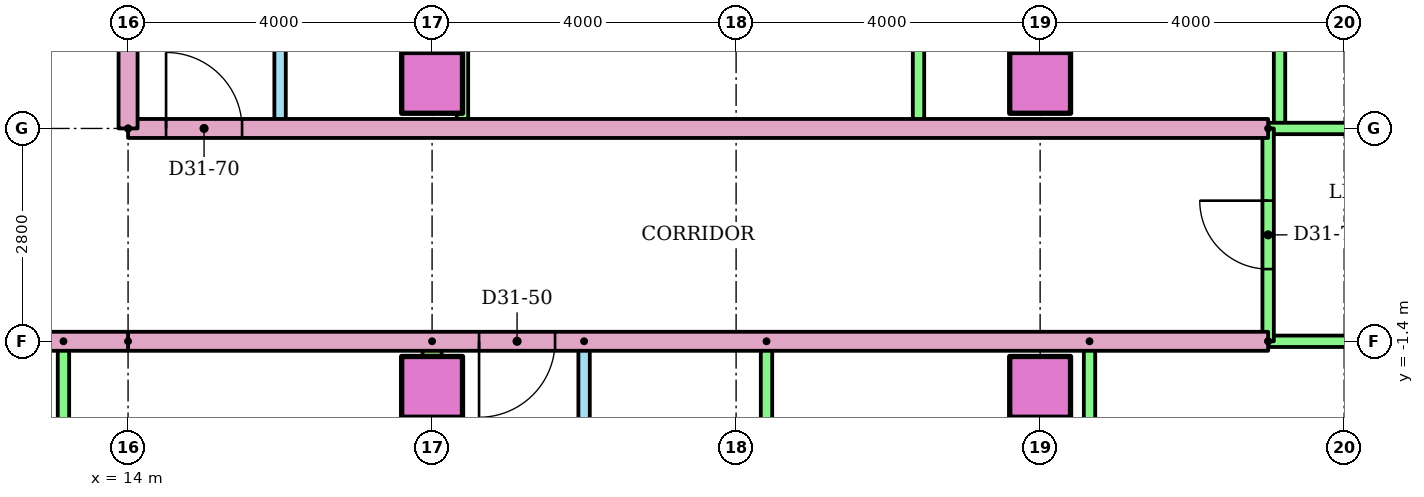
"""IFC4 building model, lengths in metres.
Left out: names, types, materials, properties, quantities, classifications, styles, units other than length and angle.
Written with IfcOpenShell. Run it as: python <this file> out.ifc"""

import sys

from ifc_helpers import new_model, si_unit, direction, frame, frame_2d, origin, origin_2d, place, context, subcontext, project, spatial, rectangle, extrude, element, fill, save


model = new_model("IFC4")
c1 = context("Model", 3, precision=1e-05, world=origin(), true_north=direction((0.0, 1.0)))
c2 = subcontext(c1, "Body", "Model", "MODEL_VIEW")
j1 = project(units=[si_unit("LENGTHUNIT", "METRE"), si_unit("PLANEANGLEUNIT", "RADIAN")], contexts=[c1])
p1 = place(None, origin())
s1 = spatial("IfcSite", under=j1, at=p1, CompositionType="ELEMENT")
p2 = place(p1, origin())
s2 = spatial("IfcBuilding", under=s1, at=p2, CompositionType="ELEMENT")
p3 = place(p2, frame((0.0, 0.0, 123.0)))
s3 = spatial("IfcBuildingStorey", under=s2, at=p3, CompositionType="ELEMENT", Elevation=123.0)
for number, where in (
    (1, (18.0, -2.0, 0.0)),
    (2, (26.0, -2.0, 0.0)),
    (3, (18.0, 2.0, 0.0)),
    (4, (26.0, 2.0, 0.0)),
):
    element("IfcColumn", number, at=place(p3, frame(where)), inside=s3, PredefinedType="COLUMN", context=c2, shape_type="SweptSolid", body=[
        extrude(rectangle(XDim=0.8, YDim=0.8, at=origin_2d()), origin(), (0.0, 0.0, 1.0), 3.2),
    ])
p4 = place(p3, frame((13.15, -1.4, 0.0), z_axis=(0.0, 0.0, 1.0), x_axis=(0.0, -1.0, 0.0)))
e5 = element("IfcWall", 5, at=p4, inside=s3, PredefinedType="PARTITIONING", context=c2, shape_type="SweptSolid", body=[
    extrude(rectangle(XDim=6.6, YDim=0.15, at=frame_2d((3.3, 0.0))), origin(), (0.0, 0.0, 1.0), 2.4),
])
p5 = place(p3, frame((20.0, -1.4, 0.0), z_axis=(0.0, 0.0, 1.0), x_axis=(0.0, -1.0, 0.0)))
e6 = element("IfcWall", 6, at=p5, inside=s3, PredefinedType="PARTITIONING", context=c2, shape_type="SweptSolid", body=[
    extrude(rectangle(XDim=6.6, YDim=0.15, at=frame_2d((3.3, 0.0))), origin(), (0.0, 0.0, 1.0), 2.4),
])
p6 = place(p5, frame((1.425, 0.0, 0.0)))
e7 = element("IfcOpeningElement", 7, at=p6, cuts=e6, PredefinedType="OPENING", context=c2, shape_type="SweptSolid", body=[
    extrude(rectangle(XDim=0.9, YDim=2.1, at=frame_2d((0.45, 1.05))), frame((0.0, 0.085, 0.0), z_axis=(0.0, -1.0, 0.0), x_axis=(1.0, 0.0, 0.0)), (0.0, 0.0, 1.0), 0.17),
])
p7 = place(p5, frame((4.775, 0.0, 0.0)))
e8 = element("IfcOpeningElement", 8, at=p7, cuts=e6, PredefinedType="OPENING", context=c2, shape_type="SweptSolid", body=[
    extrude(rectangle(XDim=0.8, YDim=2.1, at=frame_2d((0.4, 1.05))), frame((0.0, 0.085, 0.0), z_axis=(0.0, -1.0, 0.0), x_axis=(1.0, 0.0, 0.0)), (0.0, 0.0, 1.0), 0.17),
])
for number, where, z_axis, x_axis in (
    (9, (22.4, -1.4, 0.0), (0.0, 0.0, 1.0), (0.0, -1.0, 0.0)),
    (10, (26.65, -1.4, 0.0), (0.0, 0.0, 1.0), (0.0, -1.0, 0.0)),
):
    element("IfcWall", number, at=place(p3, frame(where, z_axis=z_axis, x_axis=x_axis)), inside=s3, PredefinedType="PARTITIONING", context=c2, shape_type="SweptSolid", body=[
        extrude(rectangle(XDim=6.6, YDim=0.15, at=frame_2d((3.3, 0.0))), origin(), (0.0, 0.0, 1.0), 2.4),
    ])
p8 = place(p3, frame((18.0, -1.4, 0.0), z_axis=(0.0, 0.0, 1.0), x_axis=(0.0, -1.0, 0.0)))
e11 = element("IfcWall", 11, at=p8, inside=s3, PredefinedType="PARTITIONING", context=c2, shape_type="SweptSolid", body=[
    extrude(rectangle(XDim=14.91, YDim=0.25, at=frame_2d((7.455, 0.0))), origin(), (0.0, 0.0, 1.0), 2.4),
])
p9 = place(p3, frame((29.0, -1.4, 0.0), z_axis=(0.0, 0.0, 1.0), x_axis=(-1.0, 0.0, 0.0)))
e12 = element("IfcWall", 12, at=p9, inside=s3, PredefinedType="PARTITIONING", context=c2, shape_type="SweptSolid", body=[
    extrude(rectangle(XDim=15.0, YDim=0.25, at=frame_2d((7.5, 0.0))), origin(), (0.0, 0.0, 1.0), 2.4),
])
p10 = place(p9, frame((9.382, 0.0, 0.0)))
e13 = element("IfcOpeningElement", 13, at=p10, cuts=e12, PredefinedType="OPENING", context=c2, shape_type="SweptSolid", body=[
    extrude(rectangle(XDim=1.0, YDim=2.1, at=frame_2d((0.5, 1.05))), frame((0.0, 0.135, 0.0), z_axis=(0.0, -1.0, 0.0), x_axis=(1.0, 0.0, 0.0)), (0.0, 0.0, 1.0), 0.27),
])
p11 = place(p3, frame((32.72, -1.4, 0.0), z_axis=(0.0, 0.0, 1.0), x_axis=(-1.0, 0.0, 0.0)))
e14 = element("IfcWall", 14, at=p11, inside=s3, PredefinedType="PARTITIONING", context=c2, shape_type="SweptSolid", body=[
    extrude(rectangle(XDim=3.72, YDim=0.15, at=frame_2d((1.86, 0.0))), origin(), (0.0, 0.0, 1.0), 2.4),
])
p12 = place(p3, frame((16.0, 10.4, 0.0), z_axis=(0.0, 0.0, 1.0), x_axis=(0.0, -1.0, 0.0)))
e15 = element("IfcWall", 15, at=p12, inside=s3, PredefinedType="PARTITIONING", context=c2, shape_type="SweptSolid", body=[
    extrude(rectangle(XDim=9.0, YDim=0.15, at=frame_2d((4.5, 0.0))), origin(), (0.0, 0.0, 1.0), 2.4),
])
p13 = place(p12, frame((6.05, 0.0, 0.0)))
e16 = element("IfcOpeningElement", 16, at=p13, cuts=e15, PredefinedType="OPENING", context=c2, shape_type="SweptSolid", body=[
    extrude(rectangle(XDim=0.9, YDim=2.1, at=frame_2d((0.45, 1.05))), frame((0.0, 0.085, 0.0), z_axis=(0.0, -1.0, 0.0), x_axis=(1.0, 0.0, 0.0)), (0.0, 0.0, 1.0), 0.17),
])
p14 = place(p12, frame((1.6, 0.0, 0.0)))
e17 = element("IfcOpeningElement", 17, at=p14, cuts=e15, PredefinedType="OPENING", context=c2, shape_type="SweptSolid", body=[
    extrude(rectangle(XDim=0.8, YDim=2.1, at=frame_2d((0.4, 1.05))), frame((0.0, 0.085, 0.0), z_axis=(0.0, -1.0, 0.0), x_axis=(1.0, 0.0, 0.0)), (0.0, 0.0, 1.0), 0.17),
])
for number, where, z_axis, x_axis in (
    (18, (18.4, 10.4, 0.0), (0.0, 0.0, 1.0), (0.0, -1.0, 0.0)),
    (19, (24.4, 10.4, 0.0), (0.0, 0.0, 1.0), (0.0, -1.0, 0.0)),
    (20, (29.15, 10.4, 0.0), (0.0, 0.0, 1.0), (0.0, -1.0, 0.0)),
):
    element("IfcWall", number, at=place(p3, frame(where, z_axis=z_axis, x_axis=x_axis)), inside=s3, PredefinedType="PARTITIONING", context=c2, shape_type="SweptSolid", body=[
        extrude(rectangle(XDim=9.0, YDim=0.15, at=frame_2d((4.5, 0.0))), origin(), (0.0, 0.0, 1.0), 2.4),
    ])
p15 = place(p3, frame((14.0, 1.4, 0.0)))
e21 = element("IfcWall", 21, at=p15, inside=s3, PredefinedType="PARTITIONING", context=c2, shape_type="SweptSolid", body=[
    extrude(rectangle(XDim=15.0, YDim=0.25, at=frame_2d((7.5, 0.0))), origin(), (0.0, 0.0, 1.0), 2.4),
])
p16 = place(p15, frame((0.5, 0.0, 0.0)))
e22 = element("IfcOpeningElement", 22, at=p16, cuts=e21, PredefinedType="OPENING", context=c2, shape_type="SweptSolid", body=[
    extrude(rectangle(XDim=1.0, YDim=2.1, at=frame_2d((0.5, 1.05))), frame((0.0, 0.135, 0.0), z_axis=(0.0, -1.0, 0.0), x_axis=(1.0, 0.0, 0.0)), (0.0, 0.0, 1.0), 0.27),
])
p17 = place(p3, frame((29.0, 1.4, 0.0)))
e23 = element("IfcWall", 23, at=p17, inside=s3, PredefinedType="PARTITIONING", context=c2, shape_type="SweptSolid", body=[
    extrude(rectangle(XDim=3.72, YDim=0.15, at=frame_2d((1.86, 0.0))), origin(), (0.0, 0.0, 1.0), 2.4),
])
p18 = place(p3, frame((29.0, -1.4, 0.0), z_axis=(0.0, 0.0, 1.0), x_axis=(0.0, 1.0, 0.0)))
e24 = element("IfcWall", 24, at=p18, inside=s3, PredefinedType="PARTITIONING", context=c2, shape_type="SweptSolid", body=[
    extrude(rectangle(XDim=2.8, YDim=0.15, at=frame_2d((1.4, 0.0))), origin(), (0.0, 0.0, 1.0), 2.4),
])
p19 = place(p18, frame((0.95, 0.0, 0.0)))
e25 = element("IfcOpeningElement", 25, at=p19, cuts=e24, PredefinedType="OPENING", context=c2, shape_type="SweptSolid", body=[
    extrude(rectangle(XDim=0.9, YDim=2.1, at=frame_2d((0.45, 1.05))), frame((0.0, 0.085, 0.0), z_axis=(0.0, -1.0, 0.0), x_axis=(1.0, 0.0, 0.0)), (0.0, 0.0, 1.0), 0.17),
])
p20 = place(p3, frame((14.0, -1.4, 0.0), z_axis=(0.0, 0.0, 1.0), x_axis=(-1.0, 0.0, 0.0)))
e26 = element("IfcWall", 26, at=p20, inside=s3, PredefinedType="PARTITIONING", context=c2, shape_type="SweptSolid", body=[
    extrude(rectangle(XDim=28.0, YDim=0.25, at=frame_2d((14.0, 0.0))), origin(), (0.0, 0.0, 1.0), 2.4),
])
p21 = place(p20, frame((12.618, 0.0, 0.0)))
e27 = element("IfcOpeningElement", 27, at=p21, cuts=e26, PredefinedType="OPENING", context=c2, shape_type="SweptSolid", body=[
    extrude(rectangle(XDim=1.0, YDim=2.1, at=frame_2d((0.5, 1.05))), frame((0.0, 0.135, 0.0), z_axis=(0.0, -1.0, 0.0), x_axis=(1.0, 0.0, 0.0)), (0.0, 0.0, 1.0), 0.27),
])
p22 = place(p20, frame((10.382, 0.0, 0.0)))
e28 = element("IfcOpeningElement", 28, at=p22, cuts=e26, PredefinedType="OPENING", context=c2, shape_type="SweptSolid", body=[
    extrude(rectangle(XDim=1.0, YDim=2.1, at=frame_2d((0.5, 1.05))), frame((0.0, 0.135, 0.0), z_axis=(0.0, -1.0, 0.0), x_axis=(1.0, 0.0, 0.0)), (0.0, 0.0, 1.0), 0.27),
])
p23 = place(p3, frame((14.0, 1.4, 0.0), z_axis=(0.0, 0.0, 1.0), x_axis=(0.0, 1.0, 0.0)))
e29 = element("IfcWall", 29, at=p23, inside=s3, PredefinedType="PARTITIONING", context=c2, shape_type="SweptSolid", body=[
    extrude(rectangle(XDim=1.6, YDim=0.25, at=frame_2d((0.8, 0.0))), origin(), (0.0, 0.0, 1.0), 2.4),
])
p24 = place(p10, origin())
e30 = element("IfcDoor", 30, at=p24, inside=s3, OperationType="SINGLE_SWING_RIGHT", PredefinedType="DOOR", context=c2, shape_type="SweptSolid", body=[
    extrude(rectangle(XDim=1.0, YDim=2.1, at=frame_2d((0.5, 1.05))), frame((0.0, 0.025, 0.0), z_axis=(0.0, -1.0, 0.0), x_axis=(1.0, 0.0, 0.0)), (0.0, 0.0, 1.0), 0.05),
])
fill(e13, e30)
p25 = place(p16, origin())
e31 = element("IfcDoor", 31, at=p25, inside=s3, OperationType="SINGLE_SWING_LEFT", PredefinedType="DOOR", context=c2, shape_type="SweptSolid", body=[
    extrude(rectangle(XDim=1.0, YDim=2.1, at=frame_2d((0.5, 1.05))), frame((0.0, 0.025, 0.0), z_axis=(0.0, -1.0, 0.0), x_axis=(1.0, 0.0, 0.0)), (0.0, 0.0, 1.0), 0.05),
])
fill(e22, e31)
p26 = place(p19, origin())
e32 = element("IfcDoor", 32, at=p26, inside=s3, OperationType="SINGLE_SWING_RIGHT", PredefinedType="DOOR", context=c2, shape_type="SweptSolid", body=[
    extrude(rectangle(XDim=0.9, YDim=2.1, at=frame_2d((0.45, 1.05))), frame((0.0, 0.025, 0.0), z_axis=(0.0, -1.0, 0.0), x_axis=(1.0, 0.0, 0.0)), (0.0, 0.0, 1.0), 0.05),
])
fill(e25, e32)
save(model, sys.argv[1])
